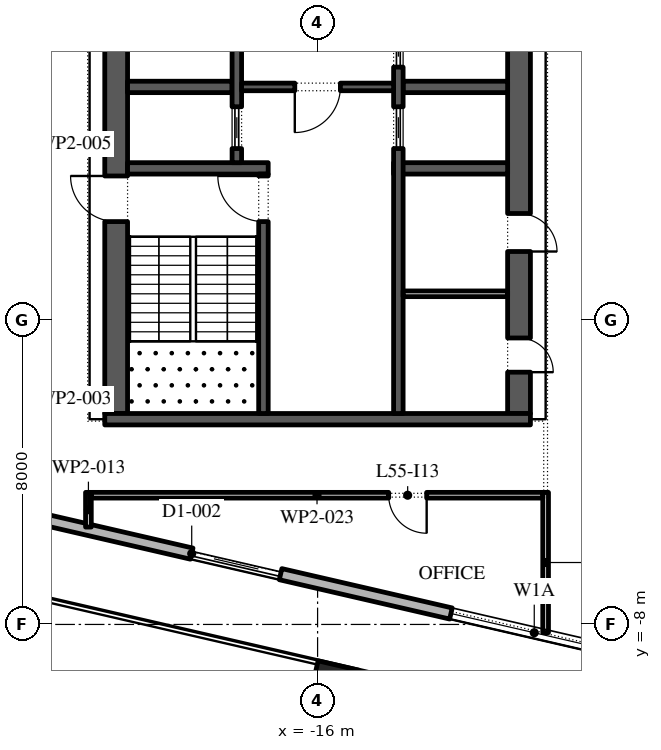
"""IFC4 building model, lengths in metres.
Left out: names, types, materials, properties, quantities, classifications, styles, units other than length and angle.
Written with IfcOpenShell. Run it as: python <this file> out.ifc"""

import sys

from ifc_helpers import new_model, si_unit, direction, frame, frame_2d, origin, origin_2d, place, context, subcontext, project, spatial, rectangle, extrude, element, fill, save


model = new_model("IFC4")
c1 = context("Model", 3, precision=1e-05, world=origin(), true_north=direction((0.0, 1.0)))
c2 = subcontext(c1, "Body", "Model", "MODEL_VIEW")
j1 = project(units=[si_unit("LENGTHUNIT", "METRE"), si_unit("PLANEANGLEUNIT", "RADIAN")], contexts=[c1])
p1 = place(None, origin())
s1 = spatial("IfcSite", under=j1, at=p1, CompositionType="ELEMENT")
p2 = place(p1, origin())
s2 = spatial("IfcBuilding", under=s1, at=p2, CompositionType="ELEMENT")
p3 = place(p2, frame((0.0, 0.0, 255.6)))
s3 = spatial("IfcBuildingStorey", under=s2, at=p3, CompositionType="ELEMENT", Elevation=255.6)
p4 = place(p3, frame((-15.574, -9.617, 0.0), z_axis=(0.0, 0.0, 1.0), x_axis=(0.974370064785, -0.224951054344, 0.0)))
e1 = element("IfcColumn", 1, at=p4, inside=s3, PredefinedType="COLUMN", context=c2, shape_type="SweptSolid", body=[
    extrude(rectangle(XDim=1.1, YDim=1.1, at=origin_2d()), origin(), (0.0, 0.0, 1.0), 4.2),
])
p5 = place(p3, frame((-29.616, -3.758, 0.0), z_axis=(0.0, 0.0, 1.0), x_axis=(0.974370532314, -0.224949029246, 0.0)))
e2 = element("IfcWall", 2, at=p5, inside=s3, PredefinedType="STANDARD", context=c2, shape_type="SweptSolid", body=[
    extrude(rectangle(XDim=48.0, YDim=0.3, at=frame_2d((24.0, 0.0))), origin(), (0.0, 0.0, 1.0), 4.0),
])
p6 = place(p5, frame((1.625, 0.0, 0.45)))
e3 = element("IfcOpeningElement", 3, at=p6, cuts=e2, PredefinedType="OPENING", context=c2, shape_type="SweptSolid", body=[
    extrude(rectangle(XDim=4.5, YDim=3.05, at=frame_2d((2.25, 1.525))), frame((0.0, 0.16, 0.0), z_axis=(0.0, -1.0, 0.0), x_axis=(1.0, 0.0, 0.0)), (0.0, 0.0, 1.0), 0.32),
])
p7 = place(p5, frame((10.575, 0.0, 0.0)))
e4 = element("IfcOpeningElement", 4, at=p7, cuts=e2, PredefinedType="OPENING", context=c2, shape_type="SweptSolid", body=[
    extrude(rectangle(XDim=2.4, YDim=3.5, at=frame_2d((1.2, 1.75))), frame((0.0, 0.16, 0.0), z_axis=(0.0, -1.0, 0.0), x_axis=(1.0, 0.0, 0.0)), (0.0, 0.0, 1.0), 0.32),
])
p8 = place(p5, frame((17.575, 0.0, 0.45)))
e5 = element("IfcOpeningElement", 5, at=p8, cuts=e2, PredefinedType="OPENING", context=c2, shape_type="SweptSolid", body=[
    extrude(rectangle(XDim=4.5, YDim=3.0, at=frame_2d((2.25, 1.5))), frame((0.0, 0.16, 0.0), z_axis=(0.0, -1.0, 0.0), x_axis=(1.0, 0.0, 0.0)), (0.0, 0.0, 1.0), 0.32),
])
p9 = place(p5, frame((25.625, 0.0, 0.45)))
e6 = element("IfcOpeningElement", 6, at=p9, cuts=e2, PredefinedType="OPENING", context=c2, shape_type="SweptSolid", body=[
    extrude(rectangle(XDim=4.5, YDim=3.05, at=frame_2d((2.25, 1.525))), frame((0.0, 0.16, 0.0), z_axis=(0.0, -1.0, 0.0), x_axis=(1.0, 0.0, 0.0)), (0.0, 0.0, 1.0), 0.32),
])
p10 = place(p5, frame((33.675, 0.0, 0.45)))
e7 = element("IfcOpeningElement", 7, at=p10, cuts=e2, PredefinedType="OPENING", context=c2, shape_type="SweptSolid", body=[
    extrude(rectangle(XDim=4.5, YDim=2.825, at=frame_2d((2.25, 1.413))), frame((0.0, 0.16, 0.0), z_axis=(0.0, -1.0, 0.0), x_axis=(1.0, 0.0, 0.0)), (0.0, 0.0, 1.0), 0.32),
])
p11 = place(p5, frame((42.775, 0.0, 0.0)))
e8 = element("IfcOpeningElement", 8, at=p11, cuts=e2, PredefinedType="OPENING", context=c2, shape_type="SweptSolid", body=[
    extrude(rectangle(XDim=2.4, YDim=3.5, at=frame_2d((1.2, 1.75))), frame((0.0, 0.16, 0.0), z_axis=(0.0, -1.0, 0.0), x_axis=(1.0, 0.0, 0.0)), (0.0, 0.0, 1.0), 0.32),
])
p12 = place(p3, frame((-21.359, 48.678, 0.0), z_axis=(0.0, 0.0, 1.0), x_axis=(-0.224949198343, -0.974370493275, 0.0)))
e9 = element("IfcWall", 9, at=p12, inside=s3, PredefinedType="STANDARD", context=c2, shape_type="SweptSolid", body=[
    extrude(rectangle(XDim=49.5, YDim=0.3, at=frame_2d((24.75, 0.0))), origin(), (0.0, 0.0, 1.0), 4.0),
])
p13 = place(p12, frame((1.157, 0.0, 0.45)))
e10 = element("IfcOpeningElement", 10, at=p13, cuts=e9, PredefinedType="OPENING", context=c2, shape_type="SweptSolid", body=[
    extrude(rectangle(XDim=4.5, YDim=3.05, at=frame_2d((2.25, 1.525))), frame((0.0, 0.16, 0.0), z_axis=(0.0, -1.0, 0.0), x_axis=(1.0, 0.0, 0.0)), (0.0, 0.0, 1.0), 0.32),
])
p14 = place(p12, frame((9.171, 0.0, 0.0)))
e11 = element("IfcOpeningElement", 11, at=p14, cuts=e9, PredefinedType="OPENING", context=c2, shape_type="SweptSolid", body=[
    extrude(rectangle(XDim=2.4, YDim=3.5, at=frame_2d((1.2, 1.75))), frame((0.0, 0.16, 0.0), z_axis=(0.0, -1.0, 0.0), x_axis=(1.0, 0.0, 0.0)), (0.0, 0.0, 1.0), 0.32),
])
p15 = place(p12, frame((15.236, 0.0, 0.45)))
e12 = element("IfcOpeningElement", 12, at=p15, cuts=e9, PredefinedType="OPENING", context=c2, shape_type="SweptSolid", body=[
    extrude(rectangle(XDim=4.5, YDim=3.05, at=frame_2d((2.25, 1.525))), frame((0.0, 0.16, 0.0), z_axis=(0.0, -1.0, 0.0), x_axis=(1.0, 0.0, 0.0)), (0.0, 0.0, 1.0), 0.32),
])
p16 = place(p12, frame((22.35, 0.0, 0.45)))
e13 = element("IfcOpeningElement", 13, at=p16, cuts=e9, PredefinedType="OPENING", context=c2, shape_type="SweptSolid", body=[
    extrude(rectangle(XDim=4.5, YDim=3.05, at=frame_2d((2.25, 1.525))), frame((0.0, 0.16, 0.0), z_axis=(0.0, -1.0, 0.0), x_axis=(1.0, 0.0, 0.0)), (0.0, 0.0, 1.0), 0.32),
])
p17 = place(p12, frame((29.464, 0.0, 0.45)))
e14 = element("IfcOpeningElement", 14, at=p17, cuts=e9, PredefinedType="OPENING", context=c2, shape_type="SweptSolid", body=[
    extrude(rectangle(XDim=4.5, YDim=3.05, at=frame_2d((2.25, 1.525))), frame((0.0, 0.16, 0.0), z_axis=(0.0, -1.0, 0.0), x_axis=(1.0, 0.0, 0.0)), (0.0, 0.0, 1.0), 0.32),
])
p18 = place(p12, frame((37.628, 0.0, 0.0)))
e15 = element("IfcOpeningElement", 15, at=p18, cuts=e9, PredefinedType="OPENING", context=c2, shape_type="SweptSolid", body=[
    extrude(rectangle(XDim=2.4, YDim=3.325, at=frame_2d((1.2, 1.663))), frame((0.0, 0.16, 0.0), z_axis=(0.0, -1.0, 0.0), x_axis=(1.0, 0.0, 0.0)), (0.0, 0.0, 1.0), 0.32),
])
p19 = place(p12, frame((43.693, 0.0, 0.45)))
e16 = element("IfcOpeningElement", 16, at=p19, cuts=e9, PredefinedType="OPENING", context=c2, shape_type="SweptSolid", body=[
    extrude(rectangle(XDim=4.5, YDim=2.825, at=frame_2d((2.25, 1.413))), frame((0.0, 0.16, 0.0), z_axis=(0.0, -1.0, 0.0), x_axis=(1.0, 0.0, 0.0)), (0.0, 0.0, 1.0), 0.32),
])
p20 = place(p3, frame((-21.3, -2.45, 0.0), z_axis=(0.0, 0.0, 1.0), x_axis=(0.0, 1.0, 0.0)))
e17 = element("IfcWall", 17, at=p20, inside=s3, PredefinedType="SHEAR", context=c2, shape_type="SweptSolid", body=[
    extrude(rectangle(XDim=27.9, YDim=0.6, at=frame_2d((13.95, 0.0))), origin(), (0.0, 0.0, 1.0), 4.0),
])
p21 = place(p20, frame((5.05, 0.0, 0.0)))
e18 = element("IfcOpeningElement", 18, at=p21, cuts=e17, PredefinedType="OPENING", context=c2, shape_type="SweptSolid", body=[
    extrude(rectangle(XDim=1.2, YDim=2.1, at=frame_2d((0.6, 1.05))), frame((0.0, 0.31, 0.0), z_axis=(0.0, -1.0, 0.0), x_axis=(1.0, 0.0, 0.0)), (0.0, 0.0, 1.0), 0.62),
])
p22 = place(p20, frame((21.65, 0.0, 0.0)))
e19 = element("IfcOpeningElement", 19, at=p22, cuts=e17, PredefinedType="OPENING", context=c2, shape_type="SweptSolid", body=[
    extrude(rectangle(XDim=1.2, YDim=2.1, at=frame_2d((0.6, 1.05))), frame((0.0, 0.31, 0.0), z_axis=(0.0, -1.0, 0.0), x_axis=(1.0, 0.0, 0.0)), (0.0, 0.0, 1.0), 0.62),
])
p23 = place(p3, frame((-10.7, -2.45, 0.0), z_axis=(0.0, 0.0, 1.0), x_axis=(0.0, 1.0, 0.0)))
e20 = element("IfcWall", 20, at=p23, inside=s3, PredefinedType="SHEAR", context=c2, shape_type="SweptSolid", body=[
    extrude(rectangle(XDim=27.9, YDim=0.6, at=frame_2d((13.95, 0.0))), origin(), (0.0, 0.0, 1.0), 4.0),
])
p24 = place(p23, frame((23.65, 0.0, 0.0)))
e21 = element("IfcOpeningElement", 21, at=p24, cuts=e20, PredefinedType="OPENING", context=c2, shape_type="SweptSolid", body=[
    extrude(rectangle(XDim=2.4, YDim=2.1, at=frame_2d((1.2, 1.05))), frame((0.0, 0.31, 0.0), z_axis=(0.0, -1.0, 0.0), x_axis=(1.0, 0.0, 0.0)), (0.0, 0.0, 1.0), 0.62),
])
p25 = place(p23, frame((1.087, 0.0, 0.0)))
e22 = element("IfcOpeningElement", 22, at=p25, cuts=e20, PredefinedType="OPENING", context=c2, shape_type="SweptSolid", body=[
    extrude(rectangle(XDim=0.9, YDim=2.1, at=frame_2d((0.45, 1.05))), frame((0.0, 0.31, 0.0), z_axis=(0.0, -1.0, 0.0), x_axis=(1.0, 0.0, 0.0)), (0.0, 0.0, 1.0), 0.62),
])
p26 = place(p23, frame((4.262, 0.0, 0.0)))
e23 = element("IfcOpeningElement", 23, at=p26, cuts=e20, PredefinedType="OPENING", context=c2, shape_type="SweptSolid", body=[
    extrude(rectangle(XDim=1.0, YDim=2.1, at=frame_2d((0.5, 1.05))), frame((0.0, 0.31, 0.0), z_axis=(0.0, -1.0, 0.0), x_axis=(1.0, 0.0, 0.0)), (0.0, 0.0, 1.0), 0.62),
])
p27 = place(p3, frame((-21.6, -2.6, 0.0), z_axis=(0.0, 0.0, 1.0), x_axis=(1.0, 0.0, 0.0)))
e24 = element("IfcWall", 24, at=p27, inside=s3, PredefinedType="SHEAR", context=c2, shape_type="SweptSolid", body=[
    extrude(rectangle(XDim=11.2, YDim=0.3, at=frame_2d((5.6, 0.0))), origin(), (0.0, 0.0, 1.0), 4.0),
])
p28 = place(p3, frame((-21.0, 4.0, 0.0), z_axis=(0.0, 0.0, 1.0), x_axis=(1.0, 0.0, 0.0)))
e25 = element("IfcWall", 25, at=p28, inside=s3, PredefinedType="SHEAR", context=c2, shape_type="SweptSolid", body=[
    extrude(rectangle(XDim=3.7, YDim=0.3, at=frame_2d((1.85, 0.0))), origin(), (0.0, 0.0, 1.0), 4.0),
])
p29 = place(p3, frame((-17.425, -2.45, 0.0), z_axis=(0.0, 0.0, 1.0), x_axis=(0.0, 1.0, 0.0)))
e26 = element("IfcWall", 26, at=p29, inside=s3, PredefinedType="SHEAR", context=c2, shape_type="SweptSolid", body=[
    extrude(rectangle(XDim=6.3, YDim=0.25, at=frame_2d((3.15, 0.0))), origin(), (0.0, 0.0, 1.0), 4.0),
])
p30 = place(p29, frame((5.05, 0.0, 0.0)))
e27 = element("IfcOpeningElement", 27, at=p30, cuts=e26, PredefinedType="OPENING", context=c2, shape_type="SweptSolid", body=[
    extrude(rectangle(XDim=1.2, YDim=2.1, at=frame_2d((0.6, 1.05))), frame((0.0, 0.135, 0.0), z_axis=(0.0, -1.0, 0.0), x_axis=(1.0, 0.0, 0.0)), (0.0, 0.0, 1.0), 0.27),
])
p31 = place(p3, frame((-21.0, 6.143, 0.0), z_axis=(0.0, 0.0, 1.0), x_axis=(1.0, 0.0, 0.0)))
e28 = element("IfcWall", 28, at=p31, inside=s3, PredefinedType="SHEAR", context=c2, shape_type="SweptSolid", body=[
    extrude(rectangle(XDim=2.75, YDim=0.3, at=frame_2d((1.375, 0.0))), origin(), (0.0, 0.0, 1.0), 4.0),
])
p32 = place(p3, frame((-18.125, 4.15, 0.0), z_axis=(0.0, 0.0, 1.0), x_axis=(0.0, 1.0, 0.0)))
e29 = element("IfcWall", 29, at=p32, inside=s3, PredefinedType="SHEAR", context=c2, shape_type="SweptSolid", body=[
    extrude(rectangle(XDim=14.7, YDim=0.25, at=frame_2d((7.35, 0.0))), origin(), (0.0, 0.0, 1.0), 4.0),
])
p33 = place(p32, frame((6.9, 0.0, 0.0)))
e30 = element("IfcOpeningElement", 30, at=p33, cuts=e29, PredefinedType="OPENING", context=c2, shape_type="SweptSolid", body=[
    extrude(rectangle(XDim=0.9, YDim=2.1, at=frame_2d((0.45, 1.05))), frame((0.0, 0.135, 0.0), z_axis=(0.0, -1.0, 0.0), x_axis=(1.0, 0.0, 0.0)), (0.0, 0.0, 1.0), 0.27),
])
p34 = place(p32, frame((0.371, 0.0, 0.0)))
e31 = element("IfcOpeningElement", 31, at=p34, cuts=e29, PredefinedType="OPENING", context=c2, shape_type="SweptSolid", body=[
    extrude(rectangle(XDim=1.1, YDim=2.1, at=frame_2d((0.55, 1.05))), frame((0.0, 0.135, 0.0), z_axis=(0.0, -1.0, 0.0), x_axis=(1.0, 0.0, 0.0)), (0.0, 0.0, 1.0), 0.27),
])
p35 = place(p32, frame((13.229, 0.0, 0.0)))
e32 = element("IfcOpeningElement", 32, at=p35, cuts=e29, PredefinedType="OPENING", context=c2, shape_type="SweptSolid", body=[
    extrude(rectangle(XDim=1.1, YDim=2.1, at=frame_2d((0.55, 1.05))), frame((0.0, 0.135, 0.0), z_axis=(0.0, -1.0, 0.0), x_axis=(1.0, 0.0, 0.0)), (0.0, 0.0, 1.0), 0.27),
])
p36 = place(p3, frame((-14.0, 4.0, 0.0), z_axis=(0.0, 0.0, 1.0), x_axis=(1.0, 0.0, 0.0)))
e33 = element("IfcWall", 33, at=p36, inside=s3, PredefinedType="SHEAR", context=c2, shape_type="SweptSolid", body=[
    extrude(rectangle(XDim=3.0, YDim=0.3, at=frame_2d((1.5, 0.0))), origin(), (0.0, 0.0, 1.0), 4.0),
])
p37 = place(p3, frame((-13.75, 6.143, 0.0), z_axis=(0.0, 0.0, 1.0), x_axis=(1.0, 0.0, 0.0)))
e34 = element("IfcWall", 34, at=p37, inside=s3, PredefinedType="SHEAR", context=c2, shape_type="SweptSolid", body=[
    extrude(rectangle(XDim=2.75, YDim=0.3, at=frame_2d((1.375, 0.0))), origin(), (0.0, 0.0, 1.0), 4.0),
])
p38 = place(p3, frame((-13.875, -2.45, 0.0), z_axis=(0.0, 0.0, 1.0), x_axis=(0.0, 1.0, 0.0)))
e35 = element("IfcWall", 35, at=p38, inside=s3, PredefinedType="SHEAR", context=c2, shape_type="SweptSolid", body=[
    extrude(rectangle(XDim=21.3, YDim=0.25, at=frame_2d((10.65, 0.0))), origin(), (0.0, 0.0, 1.0), 4.0),
])
p39 = place(p38, frame((17.786, 0.0, 0.0)))
e36 = element("IfcOpeningElement", 36, at=p39, cuts=e35, PredefinedType="OPENING", context=c2, shape_type="SweptSolid", body=[
    extrude(rectangle(XDim=0.9, YDim=2.1, at=frame_2d((0.45, 1.05))), frame((0.0, 0.135, 0.0), z_axis=(0.0, -1.0, 0.0), x_axis=(1.0, 0.0, 0.0)), (0.0, 0.0, 1.0), 0.27),
])
p40 = place(p38, frame((6.971, 0.0, 0.0)))
e37 = element("IfcOpeningElement", 37, at=p40, cuts=e35, PredefinedType="OPENING", context=c2, shape_type="SweptSolid", body=[
    extrude(rectangle(XDim=1.1, YDim=2.1, at=frame_2d((0.55, 1.05))), frame((0.0, 0.135, 0.0), z_axis=(0.0, -1.0, 0.0), x_axis=(1.0, 0.0, 0.0)), (0.0, 0.0, 1.0), 0.27),
])
p41 = place(p38, frame((9.114, 0.0, 0.0)))
e38 = element("IfcOpeningElement", 38, at=p41, cuts=e35, PredefinedType="OPENING", context=c2, shape_type="SweptSolid", body=[
    extrude(rectangle(XDim=1.1, YDim=2.1, at=frame_2d((0.55, 1.05))), frame((0.0, 0.135, 0.0), z_axis=(0.0, -1.0, 0.0), x_axis=(1.0, 0.0, 0.0)), (0.0, 0.0, 1.0), 0.27),
])
p42 = place(p38, frame((11.257, 0.0, 0.0)))
e39 = element("IfcOpeningElement", 39, at=p42, cuts=e35, PredefinedType="OPENING", context=c2, shape_type="SweptSolid", body=[
    extrude(rectangle(XDim=1.1, YDim=2.1, at=frame_2d((0.55, 1.05))), frame((0.0, 0.135, 0.0), z_axis=(0.0, -1.0, 0.0), x_axis=(1.0, 0.0, 0.0)), (0.0, 0.0, 1.0), 0.27),
])
p43 = place(p38, frame((13.4, 0.0, 0.0)))
e40 = element("IfcOpeningElement", 40, at=p43, cuts=e35, PredefinedType="OPENING", context=c2, shape_type="SweptSolid", body=[
    extrude(rectangle(XDim=1.1, YDim=2.1, at=frame_2d((0.55, 1.05))), frame((0.0, 0.135, 0.0), z_axis=(0.0, -1.0, 0.0), x_axis=(1.0, 0.0, 0.0)), (0.0, 0.0, 1.0), 0.27),
])
p44 = place(p3, frame((-18.0, 6.143, 0.0), z_axis=(0.0, 0.0, 1.0), x_axis=(1.0, 0.0, 0.0)))
e41 = element("IfcWall", 41, at=p44, inside=s3, PredefinedType="SHEAR", context=c2, shape_type="SweptSolid", body=[
    extrude(rectangle(XDim=4.0, YDim=0.2, at=frame_2d((2.0, 0.0))), origin(), (0.0, 0.0, 1.0), 4.0),
])
p45 = place(p44, frame((1.4, 0.0, 0.0)))
e42 = element("IfcOpeningElement", 42, at=p45, cuts=e41, PredefinedType="OPENING", context=c2, shape_type="SweptSolid", body=[
    extrude(rectangle(XDim=1.2, YDim=2.1, at=frame_2d((0.6, 1.05))), frame((0.0, 0.11, 0.0), z_axis=(0.0, -1.0, 0.0), x_axis=(1.0, 0.0, 0.0)), (0.0, 0.0, 1.0), 0.22),
])
p46 = place(p3, frame((-13.75, 0.7, 0.0), z_axis=(0.0, 0.0, 1.0), x_axis=(1.0, 0.0, 0.0)))
e43 = element("IfcWall", 43, at=p46, inside=s3, PredefinedType="PARTITIONING", context=c2, shape_type="SweptSolid", body=[
    extrude(rectangle(XDim=2.75, YDim=0.15, at=frame_2d((1.375, 0.0))), origin(), (0.0, 0.0, 1.0), 4.0),
])
p47 = place(p3, frame((-22.03, -4.525, 0.0), z_axis=(0.0, 0.0, 1.0), x_axis=(0.0, -1.0, 0.0)))
e44 = element("IfcWall", 44, at=p47, inside=s3, PredefinedType="PARTITIONING", context=c2, shape_type="SweptSolid", body=[
    extrude(rectangle(XDim=0.913, YDim=0.15, at=frame_2d((0.457, 0.0))), origin(), (0.0, 0.0, 1.0), 4.0),
])
p48 = place(p3, frame((-10.0, -8.216, 0.0), z_axis=(0.0, 0.0, 1.0), x_axis=(0.0, 1.0, 0.0)))
e45 = element("IfcWall", 45, at=p48, inside=s3, PredefinedType="PARTITIONING", context=c2, shape_type="SweptSolid", body=[
    extrude(rectangle(XDim=3.691, YDim=0.15, at=frame_2d((1.846, 0.0))), origin(), (0.0, 0.0, 1.0), 4.0),
])
p49 = place(p3, frame((-10.075, -4.6, 0.0), z_axis=(0.0, 0.0, 1.0), x_axis=(-1.0, 0.0, 0.0)))
e46 = element("IfcWall", 46, at=p49, inside=s3, PredefinedType="PARTITIONING", context=c2, shape_type="SweptSolid", body=[
    extrude(rectangle(XDim=11.88, YDim=0.15, at=frame_2d((5.94, 0.0))), origin(), (0.0, 0.0, 1.0), 4.0),
])
p50 = place(p49, frame((3.055, 0.0, 0.0)))
e47 = element("IfcOpeningElement", 47, at=p50, cuts=e46, PredefinedType="OPENING", context=c2, shape_type="SweptSolid", body=[
    extrude(rectangle(XDim=1.0, YDim=2.1, at=frame_2d((0.5, 1.05))), frame((0.0, 0.085, 0.0), z_axis=(0.0, -1.0, 0.0), x_axis=(1.0, 0.0, 0.0)), (0.0, 0.0, 1.0), 0.17),
])
p51 = place(p7, origin())
e48 = element("IfcDoor", 48, at=p51, inside=s3, OperationType="DOUBLE_DOOR_SLIDING", PredefinedType="DOOR", context=c2, shape_type="SweptSolid", body=[
    extrude(rectangle(XDim=2.4, YDim=3.5, at=frame_2d((1.2, 1.75))), frame((0.0, 0.025, 0.0), z_axis=(0.0, -1.0, 0.0), x_axis=(1.0, 0.0, 0.0)), (0.0, 0.0, 1.0), 0.05),
])
fill(e4, e48)
p52 = place(p8, origin())
e49 = element("IfcWindow", 49, at=p52, inside=s3, PartitioningType="DOUBLE_PANEL_VERTICAL", PredefinedType="WINDOW", context=c2, shape_type="SweptSolid", body=[
    extrude(rectangle(XDim=4.5, YDim=3.0, at=frame_2d((2.25, 1.5))), frame((0.0, 0.03, 0.0), z_axis=(0.0, -1.0, 0.0), x_axis=(1.0, 0.0, 0.0)), (0.0, 0.0, 1.0), 0.06),
])
fill(e5, e49)
p53 = place(p34, origin())
e50 = element("IfcDoor", 50, at=p53, inside=s3, OperationType="SLIDING_TO_LEFT", PredefinedType="DOOR", context=c2, shape_type="SweptSolid", body=[
    extrude(rectangle(XDim=1.1, YDim=2.1, at=frame_2d((0.55, 1.05))), frame((0.0, 0.025, 0.0), z_axis=(0.0, -1.0, 0.0), x_axis=(1.0, 0.0, 0.0)), (0.0, 0.0, 1.0), 0.05),
])
fill(e31, e50)
p54 = place(p40, origin())
e51 = element("IfcDoor", 51, at=p54, inside=s3, OperationType="SLIDING_TO_LEFT", PredefinedType="DOOR", context=c2, shape_type="SweptSolid", body=[
    extrude(rectangle(XDim=1.1, YDim=2.1, at=frame_2d((0.55, 1.05))), frame((0.0, 0.025, 0.0), z_axis=(0.0, -1.0, 0.0), x_axis=(1.0, 0.0, 0.0)), (0.0, 0.0, 1.0), 0.05),
])
fill(e37, e51)
p55 = place(p41, origin())
e52 = element("IfcDoor", 52, at=p55, inside=s3, OperationType="SLIDING_TO_LEFT", PredefinedType="DOOR", context=c2, shape_type="SweptSolid", body=[
    extrude(rectangle(XDim=1.1, YDim=2.1, at=frame_2d((0.55, 1.05))), frame((0.0, 0.025, 0.0), z_axis=(0.0, -1.0, 0.0), x_axis=(1.0, 0.0, 0.0)), (0.0, 0.0, 1.0), 0.05),
])
fill(e38, e52)
p56 = place(p45, frame((1.2, 0.0, 0.0), z_axis=(0.0, 0.0, 1.0), x_axis=(-1.0, 0.0, 0.0)))
e53 = element("IfcDoor", 53, at=p56, inside=s3, OperationType="SINGLE_SWING_LEFT", PredefinedType="DOOR", context=c2, shape_type="SweptSolid", body=[
    extrude(rectangle(XDim=1.2, YDim=2.1, at=frame_2d((0.6, 1.05))), frame((0.0, 0.025, 0.0), z_axis=(0.0, -1.0, 0.0), x_axis=(1.0, 0.0, 0.0)), (0.0, 0.0, 1.0), 0.05),
])
fill(e42, e53)
p57 = place(p30, origin())
e54 = element("IfcDoor", 54, at=p57, inside=s3, OperationType="SINGLE_SWING_LEFT", PredefinedType="DOOR", context=c2, shape_type="SweptSolid", body=[
    extrude(rectangle(XDim=1.2, YDim=2.1, at=frame_2d((0.6, 1.05))), frame((0.0, 0.025, 0.0), z_axis=(0.0, -1.0, 0.0), x_axis=(1.0, 0.0, 0.0)), (0.0, 0.0, 1.0), 0.05),
])
fill(e27, e54)
p58 = place(p21, origin())
e55 = element("IfcDoor", 55, at=p58, inside=s3, OperationType="SINGLE_SWING_LEFT", PredefinedType="DOOR", context=c2, shape_type="SweptSolid", body=[
    extrude(rectangle(XDim=1.2, YDim=2.1, at=frame_2d((0.6, 1.05))), frame((0.0, 0.025, 0.0), z_axis=(0.0, -1.0, 0.0), x_axis=(1.0, 0.0, 0.0)), (0.0, 0.0, 1.0), 0.05),
])
fill(e18, e55)
p59 = place(p25, frame((0.9, 0.55, 0.0), z_axis=(0.0, 0.0, 1.0), x_axis=(-1.0, 0.0, 0.0)))
e56 = element("IfcDoor", 56, at=p59, inside=s3, OperationType="SINGLE_SWING_LEFT", PredefinedType="DOOR", context=c2, shape_type="SweptSolid", body=[
    extrude(rectangle(XDim=0.9, YDim=2.1, at=frame_2d((0.45, 1.05))), frame((0.0, 0.3, 0.0), z_axis=(0.0, -1.0, 0.0), x_axis=(1.0, 0.0, 0.0)), (0.0, 0.0, 1.0), 0.05),
])
fill(e22, e56)
p60 = place(p26, frame((1.0, 0.55, 0.0), z_axis=(0.0, 0.0, 1.0), x_axis=(-1.0, 0.0, 0.0)))
e57 = element("IfcDoor", 57, at=p60, inside=s3, OperationType="SINGLE_SWING_LEFT", PredefinedType="DOOR", context=c2, shape_type="SweptSolid", body=[
    extrude(rectangle(XDim=1.0, YDim=2.1, at=frame_2d((0.5, 1.05))), frame((0.0, 0.3, 0.0), z_axis=(0.0, -1.0, 0.0), x_axis=(1.0, 0.0, 0.0)), (0.0, 0.0, 1.0), 0.05),
])
fill(e23, e57)
p61 = place(p50, origin())
e58 = element("IfcDoor", 58, at=p61, inside=s3, OperationType="SINGLE_SWING_RIGHT", PredefinedType="DOOR", context=c2, shape_type="SweptSolid", body=[
    extrude(rectangle(XDim=1.0, YDim=2.1, at=frame_2d((0.5, 1.05))), frame((0.0, 0.025, 0.0), z_axis=(0.0, -1.0, 0.0), x_axis=(1.0, 0.0, 0.0)), (0.0, 0.0, 1.0), 0.05),
])
fill(e47, e58)
save(model, sys.argv[1])
